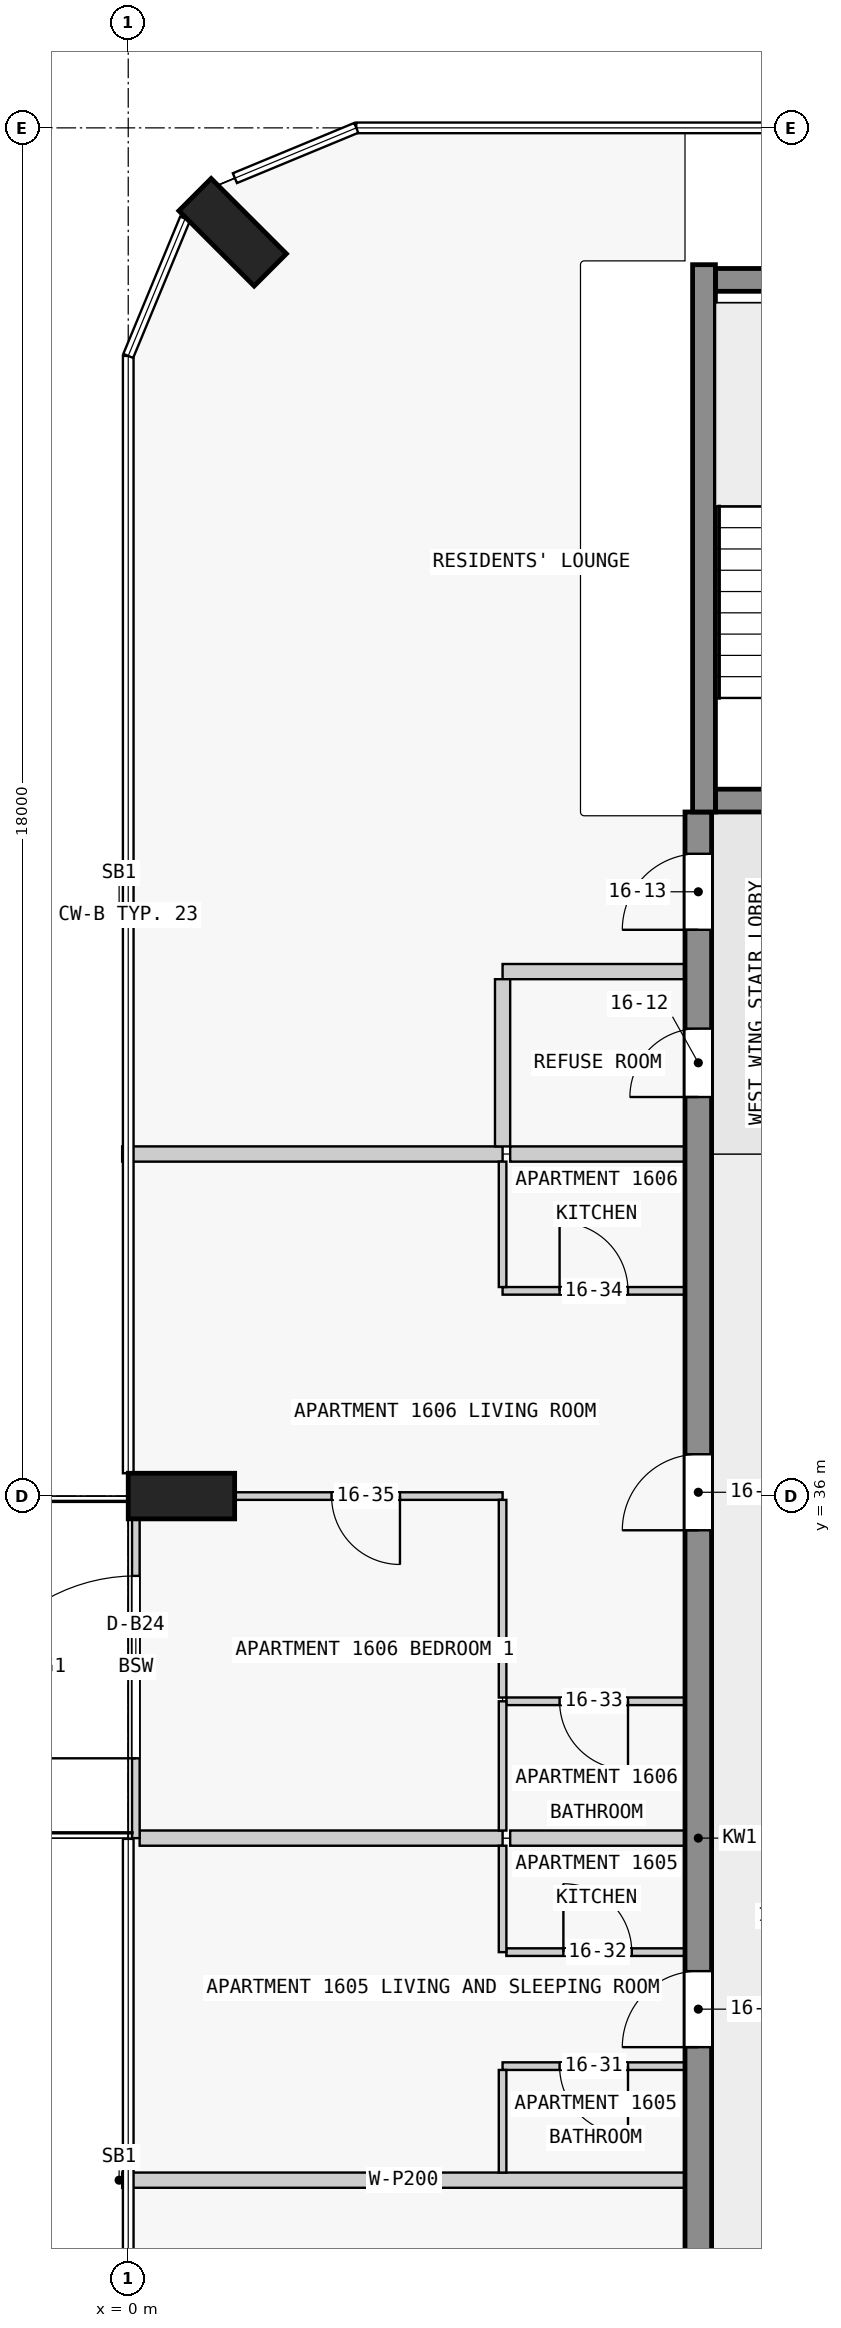
"""IFC4 building model, lengths in metres.
Left out: names, types, materials, properties, quantities, classifications, styles, units other than length and angle.
Written with IfcOpenShell. Run it as: python <this file> out.ifc"""

import sys

from ifc_helpers import new_model, si_unit, direction, frame, frame_2d, origin, origin_2d, place, context, subcontext, project, spatial, rectangle, extrude, element, fill, save


model = new_model("IFC4")
c1 = context("Model", 3, precision=1e-05, world=origin(), true_north=direction((0.0, 1.0)))
c2 = subcontext(c1, "Body", "Model", "MODEL_VIEW")
j1 = project(units=[si_unit("LENGTHUNIT", "METRE"), si_unit("PLANEANGLEUNIT", "RADIAN")], contexts=[c1])
p1 = place(None, origin())
s1 = spatial("IfcSite", under=j1, at=p1, CompositionType="ELEMENT")
p2 = place(p1, origin())
s2 = spatial("IfcBuilding", under=s1, at=p2, CompositionType="ELEMENT")
p3 = place(p2, frame((0.0, 0.0, 65.3)))
s3 = spatial("IfcBuildingStorey", under=s2, at=p3, CompositionType="ELEMENT", Elevation=65.3)
for number, where, z_axis, x_axis in (
    (1, (1.374, 52.626, 0.0), (0.0, 0.0, 1.0), (0.707, 0.707, 0.0)),
    (2, (0.7, 36.0, 0.0), (0.0, 0.0, 1.0), (0.0, 1.0, 0.0)),
):
    element("IfcColumn", number, at=place(p3, frame(where, z_axis=z_axis, x_axis=x_axis)), inside=s3, PredefinedType="COLUMN", context=c2, shape_type="SweptSolid", body=[
        extrude(rectangle(XDim=0.6, YDim=1.4, at=origin_2d()), origin(), (0.0, 0.0, 1.0), 3.5),
    ])
p4 = place(p3, frame((7.725, 45.15, 0.0), z_axis=(0.0, 0.0, 1.0), x_axis=(1.0, 0.0, 0.0)))
e3 = element("IfcWall", 3, at=p4, inside=s3, PredefinedType="SHEAR", context=c2, shape_type="SweptSolid", body=[
    extrude(rectangle(XDim=2.55, YDim=0.3, at=frame_2d((1.275, 0.0))), origin(), (0.0, 0.0, 1.0), 3.5),
])
p5 = place(p4, frame((0.725, 0.0, 0.0)))
e4 = element("IfcOpeningElement", 4, at=p5, cuts=e3, PredefinedType="OPENING", context=c2, shape_type="SweptSolid", body=[
    extrude(rectangle(XDim=1.1, YDim=2.1, at=frame_2d((0.55, 1.05))), frame((0.0, 0.16, 0.0), z_axis=(0.0, -1.0, 0.0), x_axis=(1.0, 0.0, 0.0)), (0.0, 0.0, 1.0), 0.32),
])
p6 = place(p3, frame((7.725, 52.0, 0.0), z_axis=(0.0, 0.0, 1.0), x_axis=(1.0, 0.0, 0.0)))
e5 = element("IfcWall", 5, at=p6, inside=s3, PredefinedType="SHEAR", context=c2, shape_type="SweptSolid", body=[
    extrude(rectangle(XDim=2.55, YDim=0.3, at=frame_2d((1.275, 0.0))), origin(), (0.0, 0.0, 1.0), 3.5),
])
p7 = place(p3, frame((7.575, 45.0, 0.0), z_axis=(0.0, 0.0, 1.0), x_axis=(0.0, 1.0, 0.0)))
e6 = element("IfcWall", 6, at=p7, inside=s3, PredefinedType="SHEAR", context=c2, shape_type="SweptSolid", body=[
    extrude(rectangle(XDim=7.2, YDim=0.3, at=frame_2d((3.6, 0.0))), origin(), (0.0, 0.0, 1.0), 3.5),
])
p8 = place(p3, frame((7.5, 18.0, 0.0), z_axis=(0.0, 0.0, 1.0), x_axis=(0.0, 1.0, 0.0)))
e7 = element("IfcWall", 7, at=p8, inside=s3, PredefinedType="SHEAR", context=c2, shape_type="SweptSolid", body=[
    extrude(rectangle(XDim=27.0, YDim=0.35, at=frame_2d((13.5, 0.0))), origin(), (0.0, 0.0, 1.0), 3.25),
])
p9 = place(p8, frame((1.75, 0.0, 0.0)))
e8 = element("IfcOpeningElement", 8, at=p9, cuts=e7, PredefinedType="OPENING", context=c2, shape_type="SweptSolid", body=[
    extrude(rectangle(XDim=1.0, YDim=2.1, at=frame_2d((0.5, 1.05))), frame((0.0, 0.185, 0.0), z_axis=(0.0, -1.0, 0.0), x_axis=(1.0, 0.0, 0.0)), (0.0, 0.0, 1.0), 0.37),
])
p10 = place(p8, frame((6.25, 0.0, 0.0)))
e9 = element("IfcOpeningElement", 9, at=p10, cuts=e7, PredefinedType="OPENING", context=c2, shape_type="SweptSolid", body=[
    extrude(rectangle(XDim=1.0, YDim=2.1, at=frame_2d((0.5, 1.05))), frame((0.0, 0.185, 0.0), z_axis=(0.0, -1.0, 0.0), x_axis=(1.0, 0.0, 0.0)), (0.0, 0.0, 1.0), 0.37),
])
p11 = place(p8, frame((10.75, 0.0, 0.0)))
e10 = element("IfcOpeningElement", 10, at=p11, cuts=e7, PredefinedType="OPENING", context=c2, shape_type="SweptSolid", body=[
    extrude(rectangle(XDim=1.0, YDim=2.1, at=frame_2d((0.5, 1.05))), frame((0.0, 0.185, 0.0), z_axis=(0.0, -1.0, 0.0), x_axis=(1.0, 0.0, 0.0)), (0.0, 0.0, 1.0), 0.37),
])
p12 = place(p8, frame((17.55, 0.0, 0.0)))
e11 = element("IfcOpeningElement", 11, at=p12, cuts=e7, PredefinedType="OPENING", context=c2, shape_type="SweptSolid", body=[
    extrude(rectangle(XDim=1.0, YDim=2.1, at=frame_2d((0.5, 1.05))), frame((0.0, 0.185, 0.0), z_axis=(0.0, -1.0, 0.0), x_axis=(1.0, 0.0, 0.0)), (0.0, 0.0, 1.0), 0.37),
])
p13 = place(p8, frame((23.25, 0.0, 0.0)))
e12 = element("IfcOpeningElement", 12, at=p13, cuts=e7, PredefinedType="OPENING", context=c2, shape_type="SweptSolid", body=[
    extrude(rectangle(XDim=0.9, YDim=2.1, at=frame_2d((0.45, 1.05))), frame((0.0, 0.185, 0.0), z_axis=(0.0, -1.0, 0.0), x_axis=(1.0, 0.0, 0.0)), (0.0, 0.0, 1.0), 0.37),
])
p14 = place(p8, frame((25.45, 0.0, 0.0)))
e13 = element("IfcOpeningElement", 13, at=p14, cuts=e7, PredefinedType="OPENING", context=c2, shape_type="SweptSolid", body=[
    extrude(rectangle(XDim=1.0, YDim=2.1, at=frame_2d((0.5, 1.05))), frame((0.0, 0.185, 0.0), z_axis=(0.0, -1.0, 0.0), x_axis=(1.0, 0.0, 0.0)), (0.0, 0.0, 1.0), 0.37),
])
p15 = place(p3, frame((0.1, 31.5, 0.0), z_axis=(0.0, 0.0, 1.0), x_axis=(0.0, 1.0, 0.0)))
e14 = element("IfcWall", 14, at=p15, inside=s3, PredefinedType="STANDARD", context=c2, shape_type="SweptSolid", body=[
    extrude(rectangle(XDim=4.5, YDim=0.1, at=frame_2d((2.25, 0.0))), origin(), (0.0, 0.0, 1.0), 3.25),
])
p16 = place(p15, frame((1.05, 0.0, 0.0)))
e15 = element("IfcOpeningElement", 15, at=p16, cuts=e14, PredefinedType="OPENING", context=c2, shape_type="SweptSolid", body=[
    extrude(rectangle(XDim=2.4, YDim=2.4, at=frame_2d((1.2, 1.2))), frame((0.0, 0.06, 0.0), z_axis=(0.0, -1.0, 0.0), x_axis=(1.0, 0.0, 0.0)), (0.0, 0.0, 1.0), 0.12),
])
p17 = place(p3, frame((7.325, 27.0, 0.0), z_axis=(0.0, 0.0, 1.0), x_axis=(-1.0, 0.0, 0.0)))
e16 = element("IfcWall", 16, at=p17, inside=s3, PredefinedType="PARTITIONING", context=c2, shape_type="SweptSolid", body=[
    extrude(rectangle(XDim=7.405, YDim=0.2, at=frame_2d((3.703, 0.0))), origin(), (0.0, 0.0, 1.0), 3.25),
])
p18 = place(p3, frame((7.325, 28.5, 0.0), z_axis=(0.0, 0.0, 1.0), x_axis=(-1.0, 0.0, 0.0)))
e17 = element("IfcWall", 17, at=p18, inside=s3, PredefinedType="PARTITIONING", context=c2, shape_type="SweptSolid", body=[
    extrude(rectangle(XDim=2.4, YDim=0.1, at=frame_2d((1.2, 0.0))), origin(), (0.0, 0.0, 1.0), 3.25),
])
p19 = place(p18, frame((0.75, 0.0, 0.0)))
e18 = element("IfcOpeningElement", 18, at=p19, cuts=e17, PredefinedType="OPENING", context=c2, shape_type="SweptSolid", body=[
    extrude(rectangle(XDim=0.9, YDim=2.1, at=frame_2d((0.45, 1.05))), frame((0.0, 0.06, 0.0), z_axis=(0.0, -1.0, 0.0), x_axis=(1.0, 0.0, 0.0)), (0.0, 0.0, 1.0), 0.12),
])
p20 = place(p3, frame((4.975, 30.0, 0.0), z_axis=(0.0, 0.0, 1.0), x_axis=(1.0, 0.0, 0.0)))
e19 = element("IfcWall", 19, at=p20, inside=s3, PredefinedType="PARTITIONING", context=c2, shape_type="SweptSolid", body=[
    extrude(rectangle(XDim=2.35, YDim=0.1, at=frame_2d((1.175, 0.0))), origin(), (0.0, 0.0, 1.0), 3.25),
])
p21 = place(p20, frame((0.75, 0.0, 0.0)))
e20 = element("IfcOpeningElement", 20, at=p21, cuts=e19, PredefinedType="OPENING", context=c2, shape_type="SweptSolid", body=[
    extrude(rectangle(XDim=0.9, YDim=2.1, at=frame_2d((0.45, 1.05))), frame((0.0, 0.06, 0.0), z_axis=(0.0, -1.0, 0.0), x_axis=(1.0, 0.0, 0.0)), (0.0, 0.0, 1.0), 0.12),
])
p22 = place(p3, frame((7.325, 31.5, 0.0), z_axis=(0.0, 0.0, 1.0), x_axis=(-1.0, 0.0, 0.0)))
e21 = element("IfcWall", 21, at=p22, inside=s3, PredefinedType="PARTITIONING", context=c2, shape_type="SweptSolid", body=[
    extrude(rectangle(XDim=2.3, YDim=0.2, at=frame_2d((1.15, 0.0))), origin(), (0.0, 0.0, 1.0), 3.25),
])
p23 = place(p3, frame((0.15, 31.5, 0.0), z_axis=(0.0, 0.0, 1.0), x_axis=(1.0, 0.0, 0.0)))
e22 = element("IfcWall", 22, at=p23, inside=s3, PredefinedType="PARTITIONING", context=c2, shape_type="SweptSolid", body=[
    extrude(rectangle(XDim=4.775, YDim=0.2, at=frame_2d((2.388, 0.0))), origin(), (0.0, 0.0, 1.0), 3.25),
])
p24 = place(p3, frame((7.325, 33.3, 0.0), z_axis=(0.0, 0.0, 1.0), x_axis=(-1.0, 0.0, 0.0)))
e23 = element("IfcWall", 23, at=p24, inside=s3, PredefinedType="PARTITIONING", context=c2, shape_type="SweptSolid", body=[
    extrude(rectangle(XDim=2.35, YDim=0.1, at=frame_2d((1.175, 0.0))), origin(), (0.0, 0.0, 1.0), 3.25),
])
p25 = place(p24, frame((0.75, 0.0, 0.0)))
e24 = element("IfcOpeningElement", 24, at=p25, cuts=e23, PredefinedType="OPENING", context=c2, shape_type="SweptSolid", body=[
    extrude(rectangle(XDim=0.9, YDim=2.1, at=frame_2d((0.45, 1.05))), frame((0.0, 0.06, 0.0), z_axis=(0.0, -1.0, 0.0), x_axis=(1.0, 0.0, 0.0)), (0.0, 0.0, 1.0), 0.12),
])
p26 = place(p3, frame((4.925, 36.0, 0.0), z_axis=(0.0, 0.0, 1.0), x_axis=(-1.0, 0.0, 0.0)))
e25 = element("IfcWall", 25, at=p26, inside=s3, PredefinedType="PARTITIONING", context=c2, shape_type="SweptSolid", body=[
    extrude(rectangle(XDim=3.525, YDim=0.1, at=frame_2d((1.763, 0.0))), origin(), (0.0, 0.0, 1.0), 3.25),
])
p27 = place(p26, frame((1.35, 0.0, 0.0)))
e26 = element("IfcOpeningElement", 26, at=p27, cuts=e25, PredefinedType="OPENING", context=c2, shape_type="SweptSolid", body=[
    extrude(rectangle(XDim=0.9, YDim=2.1, at=frame_2d((0.45, 1.05))), frame((0.0, 0.06, 0.0), z_axis=(0.0, -1.0, 0.0), x_axis=(1.0, 0.0, 0.0)), (0.0, 0.0, 1.0), 0.12),
])
p28 = place(p3, frame((4.925, 38.7, 0.0), z_axis=(0.0, 0.0, 1.0), x_axis=(1.0, 0.0, 0.0)))
e27 = element("IfcWall", 27, at=p28, inside=s3, PredefinedType="PARTITIONING", context=c2, shape_type="SweptSolid", body=[
    extrude(rectangle(XDim=2.4, YDim=0.1, at=frame_2d((1.2, 0.0))), origin(), (0.0, 0.0, 1.0), 3.25),
])
p29 = place(p28, frame((0.75, 0.0, 0.0)))
e28 = element("IfcOpeningElement", 28, at=p29, cuts=e27, PredefinedType="OPENING", context=c2, shape_type="SweptSolid", body=[
    extrude(rectangle(XDim=0.9, YDim=2.1, at=frame_2d((0.45, 1.05))), frame((0.0, 0.06, 0.0), z_axis=(0.0, -1.0, 0.0), x_axis=(1.0, 0.0, 0.0)), (0.0, 0.0, 1.0), 0.12),
])
p30 = place(p3, frame((7.325, 40.5, 0.0), z_axis=(0.0, 0.0, 1.0), x_axis=(-1.0, 0.0, 0.0)))
e29 = element("IfcWall", 29, at=p30, inside=s3, PredefinedType="PARTITIONING", context=c2, shape_type="SweptSolid", body=[
    extrude(rectangle(XDim=2.3, YDim=0.2, at=frame_2d((1.15, 0.0))), origin(), (0.0, 0.0, 1.0), 3.25),
])
p31 = place(p3, frame((-0.08, 40.5, 0.0), z_axis=(0.0, 0.0, 1.0), x_axis=(1.0, 0.0, 0.0)))
e30 = element("IfcWall", 30, at=p31, inside=s3, PredefinedType="PARTITIONING", context=c2, shape_type="SweptSolid", body=[
    extrude(rectangle(XDim=5.005, YDim=0.2, at=frame_2d((2.502, 0.0))), origin(), (0.0, 0.0, 1.0), 3.25),
])
p32 = place(p3, frame((7.325, 42.9, 0.0), z_axis=(0.0, 0.0, 1.0), x_axis=(-1.0, 0.0, 0.0)))
e31 = element("IfcWall", 31, at=p32, inside=s3, PredefinedType="PARTITIONING", context=c2, shape_type="SweptSolid", body=[
    extrude(rectangle(XDim=2.4, YDim=0.2, at=frame_2d((1.2, 0.0))), origin(), (0.0, 0.0, 1.0), 3.25),
])
p33 = place(p3, frame((4.925, 28.45, 0.0), z_axis=(0.0, 0.0, 1.0), x_axis=(0.0, -1.0, 0.0)))
e32 = element("IfcWall", 32, at=p33, inside=s3, PredefinedType="PARTITIONING", context=c2, shape_type="SweptSolid", body=[
    extrude(rectangle(XDim=1.35, YDim=0.1, at=frame_2d((0.675, 0.0))), origin(), (0.0, 0.0, 1.0), 3.25),
])
p34 = place(p3, frame((4.925, 31.4, 0.0), z_axis=(0.0, 0.0, 1.0), x_axis=(0.0, -1.0, 0.0)))
e33 = element("IfcWall", 33, at=p34, inside=s3, PredefinedType="PARTITIONING", context=c2, shape_type="SweptSolid", body=[
    extrude(rectangle(XDim=1.4, YDim=0.1, at=frame_2d((0.7, 0.0))), origin(), (0.0, 0.0, 1.0), 3.25),
])
p35 = place(p3, frame((4.925, 33.3, 0.0), z_axis=(0.0, 0.0, 1.0), x_axis=(0.0, -1.0, 0.0)))
e34 = element("IfcWall", 34, at=p35, inside=s3, PredefinedType="PARTITIONING", context=c2, shape_type="SweptSolid", body=[
    extrude(rectangle(XDim=1.7, YDim=0.1, at=frame_2d((0.85, 0.0))), origin(), (0.0, 0.0, 1.0), 3.25),
])
p36 = place(p3, frame((4.925, 40.4, 0.0), z_axis=(0.0, 0.0, 1.0), x_axis=(0.0, -1.0, 0.0)))
e35 = element("IfcWall", 35, at=p36, inside=s3, PredefinedType="PARTITIONING", context=c2, shape_type="SweptSolid", body=[
    extrude(rectangle(XDim=1.65, YDim=0.1, at=frame_2d((0.825, 0.0))), origin(), (0.0, 0.0, 1.0), 3.25),
])
p37 = place(p3, frame((4.925, 33.35, 0.0), z_axis=(0.0, 0.0, 1.0), x_axis=(0.0, 1.0, 0.0)))
e36 = element("IfcWall", 36, at=p37, inside=s3, PredefinedType="PARTITIONING", context=c2, shape_type="SweptSolid", body=[
    extrude(rectangle(XDim=2.6, YDim=0.1, at=frame_2d((1.3, 0.0))), origin(), (0.0, 0.0, 1.0), 3.25),
])
p38 = place(p3, frame((4.925, 42.8, 0.0), z_axis=(0.0, 0.0, 1.0), x_axis=(0.0, -1.0, 0.0)))
e37 = element("IfcWall", 37, at=p38, inside=s3, PredefinedType="PARTITIONING", context=c2, shape_type="SweptSolid", body=[
    extrude(rectangle(XDim=2.2, YDim=0.2, at=frame_2d((1.1, 0.0))), origin(), (0.0, 0.0, 1.0), 3.25),
])
p39 = place(p16, origin())
e38 = element("IfcDoor", 38, at=p39, inside=s3, OperationType="SINGLE_SWING_LEFT", PredefinedType="DOOR", context=c2, shape_type="SweptSolid", body=[
    extrude(rectangle(XDim=2.4, YDim=2.4, at=frame_2d((1.2, 1.2))), frame((0.0, 0.025, 0.0), z_axis=(0.0, -1.0, 0.0), x_axis=(1.0, 0.0, 0.0)), (0.0, 0.0, 1.0), 0.05),
])
fill(e15, e38)
p40 = place(p11, origin())
e39 = element("IfcDoor", 39, at=p40, inside=s3, OperationType="SINGLE_SWING_LEFT", PredefinedType="DOOR", context=c2, shape_type="SweptSolid", body=[
    extrude(rectangle(XDim=1.0, YDim=2.1, at=frame_2d((0.5, 1.05))), frame((0.0, 0.025, 0.0), z_axis=(0.0, -1.0, 0.0), x_axis=(1.0, 0.0, 0.0)), (0.0, 0.0, 1.0), 0.05),
])
fill(e10, e39)
p41 = place(p12, origin())
e40 = element("IfcDoor", 40, at=p41, inside=s3, OperationType="SINGLE_SWING_RIGHT", PredefinedType="DOOR", context=c2, shape_type="SweptSolid", body=[
    extrude(rectangle(XDim=1.0, YDim=2.1, at=frame_2d((0.5, 1.05))), frame((0.0, 0.025, 0.0), z_axis=(0.0, -1.0, 0.0), x_axis=(1.0, 0.0, 0.0)), (0.0, 0.0, 1.0), 0.05),
])
fill(e11, e40)
p42 = place(p13, origin())
e41 = element("IfcDoor", 41, at=p42, inside=s3, OperationType="SINGLE_SWING_RIGHT", PredefinedType="DOOR", context=c2, shape_type="SweptSolid", body=[
    extrude(rectangle(XDim=0.9, YDim=2.1, at=frame_2d((0.45, 1.05))), frame((0.0, 0.025, 0.0), z_axis=(0.0, -1.0, 0.0), x_axis=(1.0, 0.0, 0.0)), (0.0, 0.0, 1.0), 0.05),
])
fill(e12, e41)
p43 = place(p14, origin())
e42 = element("IfcDoor", 42, at=p43, inside=s3, OperationType="SINGLE_SWING_RIGHT", PredefinedType="DOOR", context=c2, shape_type="SweptSolid", body=[
    extrude(rectangle(XDim=1.0, YDim=2.1, at=frame_2d((0.5, 1.05))), frame((0.0, 0.025, 0.0), z_axis=(0.0, -1.0, 0.0), x_axis=(1.0, 0.0, 0.0)), (0.0, 0.0, 1.0), 0.05),
])
fill(e13, e42)
p44 = place(p19, origin())
e43 = element("IfcDoor", 43, at=p44, inside=s3, OperationType="SINGLE_SWING_LEFT", PredefinedType="DOOR", context=c2, shape_type="SweptSolid", body=[
    extrude(rectangle(XDim=0.9, YDim=2.1, at=frame_2d((0.45, 1.05))), frame((0.0, 0.025, 0.0), z_axis=(0.0, -1.0, 0.0), x_axis=(1.0, 0.0, 0.0)), (0.0, 0.0, 1.0), 0.05),
])
fill(e18, e43)
p45 = place(p21, origin())
e44 = element("IfcDoor", 44, at=p45, inside=s3, OperationType="SINGLE_SWING_RIGHT", PredefinedType="DOOR", context=c2, shape_type="SweptSolid", body=[
    extrude(rectangle(XDim=0.9, YDim=2.1, at=frame_2d((0.45, 1.05))), frame((0.0, 0.025, 0.0), z_axis=(0.0, -1.0, 0.0), x_axis=(1.0, 0.0, 0.0)), (0.0, 0.0, 1.0), 0.05),
])
fill(e20, e44)
p46 = place(p25, origin())
e45 = element("IfcDoor", 45, at=p46, inside=s3, OperationType="SINGLE_SWING_RIGHT", PredefinedType="DOOR", context=c2, shape_type="SweptSolid", body=[
    extrude(rectangle(XDim=0.9, YDim=2.1, at=frame_2d((0.45, 1.05))), frame((0.0, 0.025, 0.0), z_axis=(0.0, -1.0, 0.0), x_axis=(1.0, 0.0, 0.0)), (0.0, 0.0, 1.0), 0.05),
])
fill(e24, e45)
p47 = place(p29, origin())
e46 = element("IfcDoor", 46, at=p47, inside=s3, OperationType="SINGLE_SWING_LEFT", PredefinedType="DOOR", context=c2, shape_type="SweptSolid", body=[
    extrude(rectangle(XDim=0.9, YDim=2.1, at=frame_2d((0.45, 1.05))), frame((0.0, 0.025, 0.0), z_axis=(0.0, -1.0, 0.0), x_axis=(1.0, 0.0, 0.0)), (0.0, 0.0, 1.0), 0.05),
])
fill(e28, e46)
p48 = place(p27, origin())
e47 = element("IfcDoor", 47, at=p48, inside=s3, OperationType="SINGLE_SWING_RIGHT", PredefinedType="DOOR", context=c2, shape_type="SweptSolid", body=[
    extrude(rectangle(XDim=0.9, YDim=2.1, at=frame_2d((0.45, 1.05))), frame((0.0, 0.025, 0.0), z_axis=(0.0, -1.0, 0.0), x_axis=(1.0, 0.0, 0.0)), (0.0, 0.0, 1.0), 0.05),
])
fill(e26, e47)
save(model, sys.argv[1])
